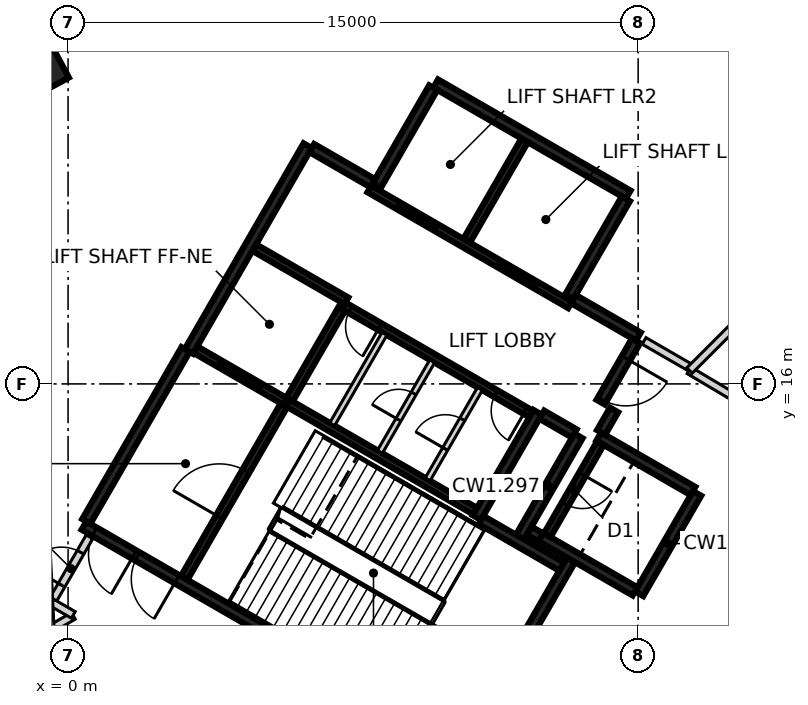
"""IFC4 building model, lengths in metres.
Left out: names, types, materials, properties, quantities, classifications, styles, units other than length and angle.
Written with IfcOpenShell. Run it as: python <this file> out.ifc"""

import sys

from ifc_helpers import new_model, si_unit, direction, frame, frame_2d, origin, origin_2d, place, context, subcontext, project, spatial, rectangle, extrude, element, fill, save


model = new_model("IFC4")
c1 = context("Model", 3, precision=1e-05, world=origin(), true_north=direction((0.0, 1.0)))
c2 = subcontext(c1, "Body", "Model", "MODEL_VIEW")
j1 = project(units=[si_unit("LENGTHUNIT", "METRE"), si_unit("PLANEANGLEUNIT", "RADIAN")], contexts=[c1])
p1 = place(None, origin())
s1 = spatial("IfcSite", under=j1, at=p1, CompositionType="ELEMENT")
p2 = place(p1, origin())
s2 = spatial("IfcBuilding", under=s1, at=p2, CompositionType="ELEMENT")
p3 = place(p2, frame((0.0, 0.0, 14.0)))
s3 = spatial("IfcBuildingStorey", under=s2, at=p3, CompositionType="ELEMENT", Elevation=14.0)
p4 = place(p3, frame((-1.197, 24.423, -0.35), z_axis=(0.0, 0.0, 1.0), x_axis=(-0.476198301069, 0.879337920289, 0.0)))
e1 = element("IfcColumn", 1, at=p4, inside=s3, PredefinedType="COLUMN", context=c2, shape_type="SweptSolid", body=[
    extrude(rectangle(XDim=1.8, YDim=1.8, at=origin_2d()), origin(), (0.0, 0.0, 1.0), 3.1),
])
p5 = place(p3, frame((10.42, 6.498, 0.0), z_axis=(0.0, 0.0, 1.0), x_axis=(-0.866021906294, 0.500006057782, 0.0)))
e2 = element("IfcWall", 2, at=p5, inside=s3, PredefinedType="SHEAR", context=c2, shape_type="SweptSolid", body=[
    extrude(rectangle(XDim=11.55, YDim=0.25, at=frame_2d((5.775, 0.0))), origin(), (0.0, 0.0, 1.0), 5.15),
])
p6 = place(p5, frame((10.025, 0.0, 0.0)))
e3 = element("IfcOpeningElement", 3, at=p6, cuts=e2, PredefinedType="OPENING", context=c2, shape_type="SweptSolid", body=[
    extrude(rectangle(XDim=1.2, YDim=2.1, at=frame_2d((0.6, 1.05))), frame((0.0, 0.135, 0.0), z_axis=(0.0, -1.0, 0.0), x_axis=(1.0, 0.0, 0.0)), (0.0, 0.0, 1.0), 0.27),
])
p7 = place(p5, frame((8.725, 0.0, 0.0)))
e4 = element("IfcOpeningElement", 4, at=p7, cuts=e2, PredefinedType="OPENING", context=c2, shape_type="SweptSolid", body=[
    extrude(rectangle(XDim=1.2, YDim=2.1, at=frame_2d((0.6, 1.05))), frame((0.0, 0.135, 0.0), z_axis=(0.0, -1.0, 0.0), x_axis=(1.0, 0.0, 0.0)), (0.0, 0.0, 1.0), 0.27),
])
p8 = place(p3, frame((3.179, 16.856, 0.0), z_axis=(0.0, 0.0, 1.0), x_axis=(0.500004234368, 0.866022959057, 0.0)))
e5 = element("IfcWall", 5, at=p8, inside=s3, PredefinedType="SHEAR", context=c2, shape_type="SweptSolid", body=[
    extrude(rectangle(XDim=6.25, YDim=0.25, at=frame_2d((3.125, 0.0))), origin(), (0.0, 0.0, 1.0), 5.15),
])
p9 = place(p3, frame((9.673, 23.903, 0.0), z_axis=(0.0, 0.0, 1.0), x_axis=(0.86603616409, -0.499981362141, 0.0)))
e6 = element("IfcWall", 6, at=p9, inside=s3, PredefinedType="SHEAR", context=c2, shape_type="SweptSolid", body=[
    extrude(rectangle(XDim=5.85, YDim=0.25, at=frame_2d((2.925, 0.0))), origin(), (0.0, 0.0, 1.0), 5.15),
])
p10 = place(p3, frame((0.48, 12.381, 0.0), z_axis=(0.0, 0.0, 1.0), x_axis=(0.49999885962, 0.866026062182, 0.0)))
e7 = element("IfcWall", 7, at=p10, inside=s3, PredefinedType="SHEAR", context=c2, shape_type="SweptSolid", body=[
    extrude(rectangle(XDim=5.225, YDim=0.25, at=frame_2d((2.612, 0.0))), origin(), (0.0, 0.0, 1.0), 5.15),
])
p11 = place(p3, frame((13.238, 11.378, 0.0), z_axis=(0.0, 0.0, 1.0), x_axis=(-0.500008851346, -0.866020293397, 0.0)))
e8 = element("IfcWall", 8, at=p11, inside=s3, PredefinedType="SHEAR", context=c2, shape_type="SweptSolid", body=[
    extrude(rectangle(XDim=5.51, YDim=0.25, at=frame_2d((2.755, 0.0))), origin(), (0.0, 0.0, 1.0), 5.15),
])
p12 = place(p3, frame((12.357, 15.252, 0.0), z_axis=(0.0, 0.0, 1.0), x_axis=(-0.500028443584, -0.866008981251, 0.0)))
e9 = element("IfcWall", 9, at=p12, inside=s3, PredefinedType="SHEAR", context=c2, shape_type="SweptSolid", body=[
    extrude(rectangle(XDim=3.2, YDim=0.25, at=frame_2d((1.6, 0.0))), origin(), (0.0, 0.0, 1.0), 5.15),
])
for number, where, z_axis, x_axis in (
    (10, (8.123, 21.219, 0.0), (0.0, 0.0, 1.0), (0.5, 0.866, 0.0)),
    (11, (14.676, 20.87, 0.0), (0.0, 0.0, 1.0), (-0.5, -0.866, 0.0)),
):
    element("IfcWall", number, at=place(p3, frame(where, z_axis=z_axis, x_axis=x_axis)), inside=s3, PredefinedType="SHEAR", context=c2, shape_type="SweptSolid", body=[
        extrude(rectangle(XDim=2.975, YDim=0.25, at=frame_2d((1.487, 0.0))), origin(), (0.0, 0.0, 1.0), 5.15),
    ])
p13 = place(p3, frame((16.552, 13.119, 0.0), z_axis=(0.0, 0.0, 1.0), x_axis=(-0.499978833458, -0.866037623948, 0.0)))
e12 = element("IfcWall", 12, at=p13, inside=s3, PredefinedType="SHEAR", context=c2, shape_type="SweptSolid", body=[
    extrude(rectangle(XDim=3.05, YDim=0.25, at=frame_2d((1.525, 0.0))), origin(), (0.0, 0.0, 1.0), 5.15),
])
p14 = place(p3, frame((14.918, 10.54, 0.0), z_axis=(0.0, 0.0, 1.0), x_axis=(-0.866063538972, 0.499933942099, 0.0)))
e13 = element("IfcWall", 13, at=p14, inside=s3, PredefinedType="SHEAR", context=c2, shape_type="SweptSolid", body=[
    extrude(rectangle(XDim=2.865, YDim=0.25, at=frame_2d((1.432, 0.0))), origin(), (0.0, 0.0, 1.0), 5.15),
])
p15 = place(p3, frame((13.963, 14.614, 0.0), z_axis=(0.0, 0.0, 1.0), x_axis=(0.866042235819, -0.499970844928, 0.0)))
e14 = element("IfcWall", 14, at=p15, inside=s3, PredefinedType="SHEAR", context=c2, shape_type="SweptSolid", body=[
    extrude(rectangle(XDim=2.865, YDim=0.25, at=frame_2d((1.432, 0.0))), origin(), (0.0, 0.0, 1.0), 5.15),
])
p16 = place(p3, frame((11.888, 11.961, 0.0), z_axis=(0.0, 0.0, 1.0), x_axis=(0.500003324108, 0.866023484601, 0.0)))
e15 = element("IfcWall", 15, at=p16, inside=s3, PredefinedType="SHEAR", context=c2, shape_type="SweptSolid", body=[
    extrude(rectangle(XDim=3.085, YDim=0.25, at=frame_2d((1.542, 0.0))), origin(), (0.0, 0.0, 1.0), 5.15),
])
p17 = place(p3, frame((10.865, 12.418, 0.0), z_axis=(0.0, 0.0, 1.0), x_axis=(0.866026229868, -0.499998569178, 0.0)))
e16 = element("IfcWall", 16, at=p17, inside=s3, PredefinedType="SHEAR", context=c2, shape_type="SweptSolid", body=[
    extrude(rectangle(XDim=2.449, YDim=0.25, at=frame_2d((1.225, 0.0))), origin(), (0.0, 0.0, 1.0), 5.15),
])
p18 = place(p3, frame((13.297, 18.231, 0.0), z_axis=(0.0, 0.0, 1.0), x_axis=(0.866043531843, -0.499968599967, 0.0)))
e17 = element("IfcWall", 17, at=p18, inside=s3, PredefinedType="SHEAR", context=c2, shape_type="SweptSolid", body=[
    extrude(rectangle(XDim=1.975, YDim=0.25, at=frame_2d((0.987, 0.0))), origin(), (0.0, 0.0, 1.0), 5.15),
])
p19 = place(p3, frame((6.413, 22.206, 0.0), z_axis=(0.0, 0.0, 1.0), x_axis=(0.866016279763, -0.500015802937, 0.0)))
e18 = element("IfcWall", 18, at=p19, inside=s3, PredefinedType="SHEAR", context=c2, shape_type="SweptSolid", body=[
    extrude(rectangle(XDim=1.849, YDim=0.25, at=frame_2d((0.925, 0.0))), origin(), (0.0, 0.0, 1.0), 5.15),
])
p20 = place(p3, frame((14.945, 17.135, 0.0), z_axis=(0.0, 0.0, 1.0), x_axis=(-0.499983108224, -0.866035156036, 0.0)))
e19 = element("IfcWall", 19, at=p20, inside=s3, PredefinedType="SHEAR", context=c2, shape_type="SweptSolid", body=[
    extrude(rectangle(XDim=1.865, YDim=0.25, at=frame_2d((0.932, 0.0))), origin(), (0.0, 0.0, 1.0), 5.15),
])
p21 = place(p20, frame((0.535, 0.0, 0.0)))
e20 = element("IfcOpeningElement", 20, at=p21, cuts=e19, PredefinedType="OPENING", context=c2, shape_type="SweptSolid", body=[
    extrude(rectangle(XDim=1.25, YDim=2.1, at=frame_2d((0.625, 1.05))), frame((0.0, 0.135, 0.0), z_axis=(0.0, -1.0, 0.0), x_axis=(1.0, 0.0, 0.0)), (0.0, 0.0, 1.0), 0.27),
])
p22 = place(p3, frame((13.322, 14.695, 0.0), z_axis=(0.0, 0.0, 1.0), x_axis=(-0.866017078145, 0.500014420154, 0.0)))
e21 = element("IfcWall", 21, at=p22, inside=s3, PredefinedType="SHEAR", context=c2, shape_type="SweptSolid", body=[
    extrude(rectangle(XDim=0.989, YDim=0.25, at=frame_2d((0.495, 0.0))), origin(), (0.0, 0.0, 1.0), 5.15),
])
p23 = place(p3, frame((14.368, 15.315, 0.0), z_axis=(0.0, 0.0, 1.0), x_axis=(-0.499897359611, -0.866084655132, 0.0)))
e22 = element("IfcWall", 22, at=p23, inside=s3, PredefinedType="SHEAR", context=c2, shape_type="SweptSolid", body=[
    extrude(rectangle(XDim=0.685, YDim=0.25, at=frame_2d((0.342, 0.0))), origin(), (0.0, 0.0, 1.0), 5.15),
])
p24 = place(p3, frame((12.433, 11.964, 0.0), z_axis=(0.0, 0.0, 1.0), x_axis=(-0.866055875208, 0.499947218231, 0.0)))
e23 = element("IfcWall", 23, at=p24, inside=s3, PredefinedType="SHEAR", context=c2, shape_type="SweptSolid", body=[
    extrude(rectangle(XDim=0.345, YDim=0.25, at=frame_2d((0.172, 0.0))), origin(), (0.0, 0.0, 1.0), 5.15),
])
p25 = place(p3, frame((13.21, 18.08, 0.0), z_axis=(0.0, 0.0, 1.0), x_axis=(-0.866030299012, 0.499991521122, 0.0)))
e24 = element("IfcWall", 24, at=p25, inside=s3, PredefinedType="SHEAR", context=c2, shape_type="SweptSolid", body=[
    extrude(rectangle(XDim=6.1, YDim=0.2, at=frame_2d((3.05, 0.0))), origin(), (0.0, 0.0, 1.0), 5.15),
])
p26 = place(p25, frame((1.0, 0.0, 0.0)))
e25 = element("IfcOpeningElement", 25, at=p26, cuts=e24, PredefinedType="OPENING", context=c2, shape_type="SweptSolid", body=[
    extrude(rectangle(XDim=1.2, YDim=2.1, at=frame_2d((0.6, 1.05))), frame((0.0, 0.11, 0.0), z_axis=(0.0, -1.0, 0.0), x_axis=(1.0, 0.0, 0.0)), (0.0, 0.0, 1.0), 0.22),
])
p27 = place(p25, frame((4.05, 0.0, 0.0)))
e26 = element("IfcOpeningElement", 26, at=p27, cuts=e24, PredefinedType="OPENING", context=c2, shape_type="SweptSolid", body=[
    extrude(rectangle(XDim=1.2, YDim=2.1, at=frame_2d((0.6, 1.05))), frame((0.0, 0.11, 0.0), z_axis=(0.0, -1.0, 0.0), x_axis=(1.0, 0.0, 0.0)), (0.0, 0.0, 1.0), 0.22),
])
p28 = place(p3, frame((5.775, 15.502, 0.0), z_axis=(0.0, 0.0, 1.0), x_axis=(0.866020080793, -0.500009219579, 0.0)))
e27 = element("IfcWall", 27, at=p28, inside=s3, PredefinedType="SHEAR", context=c2, shape_type="SweptSolid", body=[
    extrude(rectangle(XDim=5.699, YDim=0.2, at=frame_2d((2.85, 0.0))), origin(), (0.0, 0.0, 1.0), 5.15),
])
p29 = place(p3, frame((12.185, 15.207, 0.0), z_axis=(0.0, 0.0, 1.0), x_axis=(-0.866020080793, 0.500009219579, 0.0)))
e28 = element("IfcWall", 28, at=p29, inside=s3, PredefinedType="SHEAR", context=c2, shape_type="SweptSolid", body=[
    extrude(rectangle(XDim=5.699, YDim=0.2, at=frame_2d((2.85, 0.0))), origin(), (0.0, 0.0, 1.0), 5.15),
])
p30 = place(p29, frame((0.174, 0.0, 0.0)))
e29 = element("IfcOpeningElement", 29, at=p30, cuts=e28, PredefinedType="OPENING", context=c2, shape_type="SweptSolid", body=[
    extrude(rectangle(XDim=0.9, YDim=2.1, at=frame_2d((0.45, 1.05))), frame((0.0, 0.11, 0.0), z_axis=(0.0, -1.0, 0.0), x_axis=(1.0, 0.0, 0.0)), (0.0, 0.0, 1.0), 0.22),
])
p31 = place(p29, frame((4.599, 0.0, 0.0)))
e30 = element("IfcOpeningElement", 30, at=p31, cuts=e28, PredefinedType="OPENING", context=c2, shape_type="SweptSolid", body=[
    extrude(rectangle(XDim=0.9, YDim=2.1, at=frame_2d((0.45, 1.05))), frame((0.0, 0.11, 0.0), z_axis=(0.0, -1.0, 0.0), x_axis=(1.0, 0.0, 0.0)), (0.0, 0.0, 1.0), 0.22),
])
p32 = place(p3, frame((3.057, 10.895, 0.0), z_axis=(0.0, 0.0, 1.0), x_axis=(0.499989418164, 0.866031513124, 0.0)))
e31 = element("IfcWall", 31, at=p32, inside=s3, PredefinedType="SHEAR", context=c2, shape_type="SweptSolid", body=[
    extrude(rectangle(XDim=5.251, YDim=0.2, at=frame_2d((2.625, 0.0))), origin(), (0.0, 0.0, 1.0), 5.15),
])
p33 = place(p32, frame((1.849, 0.0, 0.0)))
e32 = element("IfcOpeningElement", 32, at=p33, cuts=e31, PredefinedType="OPENING", context=c2, shape_type="SweptSolid", body=[
    extrude(rectangle(XDim=1.4, YDim=2.1, at=frame_2d((0.7, 1.05))), frame((0.0, 0.11, 0.0), z_axis=(0.0, -1.0, 0.0), x_axis=(1.0, 0.0, 0.0)), (0.0, 0.0, 1.0), 0.22),
])
p34 = place(p3, frame((10.489, 19.767, 0.0), z_axis=(0.0, 0.0, 1.0), x_axis=(0.499946628782, 0.866056215479, 0.0)))
e33 = element("IfcWall", 33, at=p34, inside=s3, PredefinedType="SHEAR", context=c2, shape_type="SweptSolid", body=[
    extrude(rectangle(XDim=3.048, YDim=0.2, at=frame_2d((1.524, 0.0))), origin(), (0.0, 0.0, 1.0), 5.15),
])
p35 = place(p3, frame((14.008, 14.442, 0.0), z_axis=(0.0, 0.0, 1.0), x_axis=(-0.499986818241, -0.866033014143, 0.0)))
e34 = element("IfcWall", 34, at=p35, inside=s3, PredefinedType="SHEAR", context=c2, shape_type="SweptSolid", body=[
    extrude(rectangle(XDim=2.798, YDim=0.2, at=frame_2d((1.399, 0.0))), origin(), (0.0, 0.0, 1.0), 5.15),
])
p36 = place(p35, frame((0.949, 0.0, 0.0)))
e35 = element("IfcOpeningElement", 35, at=p36, cuts=e34, PredefinedType="OPENING", context=c2, shape_type="SweptSolid", body=[
    extrude(rectangle(XDim=0.9, YDim=2.1, at=frame_2d((0.45, 1.05))), frame((0.0, 0.11, 0.0), z_axis=(0.0, -1.0, 0.0), x_axis=(1.0, 0.0, 0.0)), (0.0, 0.0, 1.0), 0.22),
])
p37 = place(p3, frame((7.199, 17.97, 0.0), z_axis=(0.0, 0.0, 1.0), x_axis=(-0.499968400327, -0.866043647095, 0.0)))
e36 = element("IfcWall", 36, at=p37, inside=s3, PredefinedType="SHEAR", context=c2, shape_type="SweptSolid", body=[
    extrude(rectangle(XDim=2.75, YDim=0.2, at=frame_2d((1.375, 0.0))), origin(), (0.0, 0.0, 1.0), 5.15),
])
p38 = place(p3, frame((5.725, 15.531, 0.0), z_axis=(0.0, 0.0, 1.0), x_axis=(-0.866037306777, 0.499979382845, 0.0)))
e37 = element("IfcWall", 37, at=p38, inside=s3, PredefinedType="SHEAR", context=c2, shape_type="SweptSolid", body=[
    extrude(rectangle(XDim=2.742, YDim=0.2, at=frame_2d((1.371, 0.0))), origin(), (0.0, 0.0, 1.0), 5.15),
])
p39 = place(p38, frame((0.743, 0.0, 0.0)))
e38 = element("IfcOpeningElement", 38, at=p39, cuts=e37, PredefinedType="OPENING", context=c2, shape_type="SweptSolid", body=[
    extrude(rectangle(XDim=1.3, YDim=2.1, at=frame_2d((0.65, 1.05))), frame((0.0, 0.11, 0.0), z_axis=(0.0, -1.0, 0.0), x_axis=(1.0, 0.0, 0.0)), (0.0, 0.0, 1.0), 0.22),
])
p40 = place(p3, frame((4.901, 19.586, 0.0), z_axis=(0.0, 0.0, 1.0), x_axis=(0.866022890907, -0.500004352405, 0.0)))
e39 = element("IfcWall", 39, at=p40, inside=s3, PredefinedType="SHEAR", context=c2, shape_type="SweptSolid", body=[
    extrude(rectangle(XDim=2.799, YDim=0.2, at=frame_2d((1.399, 0.0))), origin(), (0.0, 0.0, 1.0), 5.15),
])
p41 = place(p3, frame((9.462, 13.489, 0.0), z_axis=(0.0, 0.0, 1.0), x_axis=(0.50002746344, 0.86600954718, 0.0)))
e40 = element("IfcWall", 40, at=p41, inside=s3, PredefinedType="PARTITIONING", context=c2, shape_type="SweptSolid", body=[
    extrude(rectangle(XDim=2.748, YDim=0.15, at=frame_2d((1.374, 0.0))), origin(), (0.0, 0.0, 1.0), 5.15),
])
p42 = place(p41, frame((0.924, 0.0, 0.0)))
e41 = element("IfcOpeningElement", 41, at=p42, cuts=e40, PredefinedType="OPENING", context=c2, shape_type="SweptSolid", body=[
    extrude(rectangle(XDim=0.9, YDim=2.1, at=frame_2d((0.45, 1.05))), frame((0.0, 0.085, 0.0), z_axis=(0.0, -1.0, 0.0), x_axis=(1.0, 0.0, 0.0)), (0.0, 0.0, 1.0), 0.17),
])
p43 = place(p3, frame((8.207, 14.214, 0.0), z_axis=(0.0, 0.0, 1.0), x_axis=(0.499922376475, 0.866070215109, 0.0)))
e42 = element("IfcWall", 42, at=p43, inside=s3, PredefinedType="PARTITIONING", context=c2, shape_type="SweptSolid", body=[
    extrude(rectangle(XDim=2.749, YDim=0.15, at=frame_2d((1.374, 0.0))), origin(), (0.0, 0.0, 1.0), 5.15),
])
p44 = place(p43, frame((0.974, 0.0, 0.0)))
e43 = element("IfcOpeningElement", 43, at=p44, cuts=e42, PredefinedType="OPENING", context=c2, shape_type="SweptSolid", body=[
    extrude(rectangle(XDim=0.8, YDim=2.1, at=frame_2d((0.4, 1.05))), frame((0.0, 0.085, 0.0), z_axis=(0.0, -1.0, 0.0), x_axis=(1.0, 0.0, 0.0)), (0.0, 0.0, 1.0), 0.17),
])
p45 = place(p3, frame((6.951, 14.939, 0.0), z_axis=(0.0, 0.0, 1.0), x_axis=(0.50002746344, 0.86600954718, 0.0)))
e44 = element("IfcWall", 44, at=p45, inside=s3, PredefinedType="PARTITIONING", context=c2, shape_type="SweptSolid", body=[
    extrude(rectangle(XDim=2.748, YDim=0.15, at=frame_2d((1.374, 0.0))), origin(), (0.0, 0.0, 1.0), 5.15),
])
p46 = place(p3, frame((-7.53, 5.473, 0.0), z_axis=(0.0, 0.0, 1.0), x_axis=(0.866256262405, 0.499599927786, 0.0)))
e45 = element("IfcWall", 45, at=p46, inside=s3, PredefinedType="PARTITIONING", context=c2, shape_type="SweptSolid", body=[
    extrude(rectangle(XDim=8.855, YDim=0.2, at=frame_2d((4.428, 0.0))), origin(), (0.0, 0.0, 1.0), 5.15),
])
p47 = place(p3, frame((-0.43, 10.259, 0.0), z_axis=(0.0, 0.0, 1.0), x_axis=(0.500667330647, 0.865639777288, 0.0)))
e46 = element("IfcWall", 46, at=p47, inside=s3, PredefinedType="PARTITIONING", context=c2, shape_type="SweptSolid", body=[
    extrude(rectangle(XDim=1.983, YDim=0.2, at=frame_2d((0.991, 0.0))), origin(), (0.0, 0.0, 1.0), 5.15),
])
p48 = place(p47, frame((0.515, 0.0, 0.0)))
e47 = element("IfcOpeningElement", 47, at=p48, cuts=e46, PredefinedType="OPENING", context=c2, shape_type="SweptSolid", body=[
    extrude(rectangle(XDim=1.0, YDim=2.1, at=frame_2d((0.5, 1.05))), frame((0.0, 0.11, 0.0), z_axis=(0.0, -1.0, 0.0), x_axis=(1.0, 0.0, 0.0)), (0.0, 0.0, 1.0), 0.22),
])
p49 = place(p3, frame((-0.424, 10.246, 0.0), z_axis=(0.0, 0.0, 1.0), x_axis=(0.866360968405, -0.499418334089, 0.0)))
e48 = element("IfcWall", 48, at=p49, inside=s3, PredefinedType="PARTITIONING", context=c2, shape_type="SweptSolid", body=[
    extrude(rectangle(XDim=0.649, YDim=0.2, at=frame_2d((0.324, 0.0))), origin(), (0.0, 0.0, 1.0), 5.15),
])
p50 = place(p3, frame((15.156, 17.131, 0.0), z_axis=(0.0, 0.0, 1.0), x_axis=(0.865567897455, -0.500791588284, 0.0)))
e49 = element("IfcWall", 49, at=p50, inside=s3, PredefinedType="PARTITIONING", context=c2, shape_type="SweptSolid", body=[
    extrude(rectangle(XDim=1.377, YDim=0.2, at=frame_2d((0.688, 0.0))), origin(), (0.0, 0.0, 1.0), 5.15),
])
p51 = place(p3, frame((16.341, 16.356, 0.0), z_axis=(0.0, 0.0, 1.0), x_axis=(0.859680670174, -0.510831817067, 0.0)))
e50 = element("IfcWall", 50, at=p51, inside=s3, PredefinedType="PARTITIONING", context=c2, shape_type="SweptSolid", body=[
    extrude(rectangle(XDim=2.502, YDim=0.2, at=frame_2d((1.251, 0.0))), origin(), (0.0, 0.0, 1.0), 5.15),
])
p52 = place(p3, frame((16.957, 8.542, 0.0), z_axis=(0.0, 0.0, 1.0), x_axis=(0.506952960322, 0.861973721189, 0.0)))
e51 = element("IfcWall", 51, at=p52, inside=s3, PredefinedType="PARTITIONING", context=c2, shape_type="SweptSolid", body=[
    extrude(rectangle(XDim=4.448, YDim=0.2, at=frame_2d((2.224, 0.0))), origin(), (0.0, 0.0, 1.0), 5.15),
])
p53 = place(p3, frame((-1.486, 30.314, 0.0), z_axis=(0.0, 0.0, 1.0), x_axis=(0.048977126554, -0.998799900418, 0.0)))
e52 = element("IfcWall", 52, at=p53, inside=s3, PredefinedType="PARTITIONING", context=c2, shape_type="SweptSolid", body=[
    extrude(rectangle(XDim=20.792, YDim=0.2, at=frame_2d((10.396, 0.0))), origin(), (0.0, 0.0, 1.0), 2.75),
])
p54 = place(p3, frame((16.352, 16.352, 0.0), z_axis=(0.0, 0.0, 1.0), x_axis=(0.707106781187, 0.707106781187, 0.0)))
e53 = element("IfcWall", 53, at=p54, inside=s3, PredefinedType="PARTITIONING", context=c2, shape_type="SweptSolid", body=[
    extrude(rectangle(XDim=15.054, YDim=0.2, at=frame_2d((7.527, 0.0))), origin(), (0.0, 0.0, 1.0), 2.75),
])
p55 = place(p39, origin())
e54 = element("IfcDoor", 54, at=p55, inside=s3, OperationType="SLIDING_TO_LEFT", PredefinedType="DOOR", context=c2, shape_type="SweptSolid", body=[
    extrude(rectangle(XDim=1.3, YDim=2.1, at=frame_2d((0.65, 1.05))), frame((0.0, 0.025, 0.0), z_axis=(0.0, -1.0, 0.0), x_axis=(1.0, 0.0, 0.0)), (0.0, 0.0, 1.0), 0.05),
])
fill(e38, e54)
p56 = place(p26, origin())
e55 = element("IfcDoor", 55, at=p56, inside=s3, OperationType="DOUBLE_DOOR_SLIDING", PredefinedType="DOOR", context=c2, shape_type="SweptSolid", body=[
    extrude(rectangle(XDim=1.2, YDim=2.1, at=frame_2d((0.6, 1.05))), frame((0.0, 0.025, 0.0), z_axis=(0.0, -1.0, 0.0), x_axis=(1.0, 0.0, 0.0)), (0.0, 0.0, 1.0), 0.05),
])
fill(e25, e55)
p57 = place(p27, origin())
e56 = element("IfcDoor", 56, at=p57, inside=s3, OperationType="DOUBLE_DOOR_SLIDING", PredefinedType="DOOR", context=c2, shape_type="SweptSolid", body=[
    extrude(rectangle(XDim=1.2, YDim=2.1, at=frame_2d((0.6, 1.05))), frame((0.0, 0.025, 0.0), z_axis=(0.0, -1.0, 0.0), x_axis=(1.0, 0.0, 0.0)), (0.0, 0.0, 1.0), 0.05),
])
fill(e26, e56)
p58 = place(p21, origin())
e57 = element("IfcDoor", 57, at=p58, inside=s3, OperationType="SINGLE_SWING_LEFT", PredefinedType="DOOR", context=c2, shape_type="SweptSolid", body=[
    extrude(rectangle(XDim=1.25, YDim=2.1, at=frame_2d((0.625, 1.05))), frame((0.0, 0.025, 0.0), z_axis=(0.0, -1.0, 0.0), x_axis=(1.0, 0.0, 0.0)), (0.0, 0.0, 1.0), 0.05),
])
fill(e20, e57)
p59 = place(p6, origin())
e58 = element("IfcDoor", 58, at=p59, inside=s3, OperationType="SINGLE_SWING_LEFT", PredefinedType="DOOR", context=c2, shape_type="SweptSolid", body=[
    extrude(rectangle(XDim=1.2, YDim=2.1, at=frame_2d((0.6, 1.05))), frame((0.0, 0.025, 0.0), z_axis=(0.0, -1.0, 0.0), x_axis=(1.0, 0.0, 0.0)), (0.0, 0.0, 1.0), 0.05),
])
fill(e3, e58)
p60 = place(p7, origin())
e59 = element("IfcDoor", 59, at=p60, inside=s3, OperationType="SINGLE_SWING_RIGHT", PredefinedType="DOOR", context=c2, shape_type="SweptSolid", body=[
    extrude(rectangle(XDim=1.2, YDim=2.1, at=frame_2d((0.6, 1.05))), frame((0.0, 0.025, 0.0), z_axis=(0.0, -1.0, 0.0), x_axis=(1.0, 0.0, 0.0)), (0.0, 0.0, 1.0), 0.05),
])
fill(e4, e59)
p61 = place(p33, origin())
e60 = element("IfcDoor", 60, at=p61, inside=s3, OperationType="SINGLE_SWING_LEFT", PredefinedType="DOOR", context=c2, shape_type="SweptSolid", body=[
    extrude(rectangle(XDim=1.4, YDim=2.1, at=frame_2d((0.7, 1.05))), frame((0.0, 0.025, 0.0), z_axis=(0.0, -1.0, 0.0), x_axis=(1.0, 0.0, 0.0)), (0.0, 0.0, 1.0), 0.05),
])
fill(e32, e60)
p62 = place(p30, origin())
e61 = element("IfcDoor", 61, at=p62, inside=s3, OperationType="SINGLE_SWING_RIGHT", PredefinedType="DOOR", context=c2, shape_type="SweptSolid", body=[
    extrude(rectangle(XDim=0.9, YDim=2.1, at=frame_2d((0.45, 1.05))), frame((0.0, 0.025, 0.0), z_axis=(0.0, -1.0, 0.0), x_axis=(1.0, 0.0, 0.0)), (0.0, 0.0, 1.0), 0.05),
])
fill(e29, e61)
p63 = place(p42, origin())
e62 = element("IfcDoor", 62, at=p63, inside=s3, OperationType="SINGLE_SWING_LEFT", PredefinedType="DOOR", context=c2, shape_type="SweptSolid", body=[
    extrude(rectangle(XDim=0.9, YDim=2.1, at=frame_2d((0.45, 1.05))), frame((0.0, 0.025, 0.0), z_axis=(0.0, -1.0, 0.0), x_axis=(1.0, 0.0, 0.0)), (0.0, 0.0, 1.0), 0.05),
])
fill(e41, e62)
p64 = place(p44, origin())
e63 = element("IfcDoor", 63, at=p64, inside=s3, OperationType="SINGLE_SWING_RIGHT", PredefinedType="DOOR", context=c2, shape_type="SweptSolid", body=[
    extrude(rectangle(XDim=0.8, YDim=2.1, at=frame_2d((0.4, 1.05))), frame((0.0, 0.025, 0.0), z_axis=(0.0, -1.0, 0.0), x_axis=(1.0, 0.0, 0.0)), (0.0, 0.0, 1.0), 0.05),
])
fill(e43, e63)
p65 = place(p31, origin())
e64 = element("IfcDoor", 64, at=p65, inside=s3, OperationType="SINGLE_SWING_LEFT", PredefinedType="DOOR", context=c2, shape_type="SweptSolid", body=[
    extrude(rectangle(XDim=0.9, YDim=2.1, at=frame_2d((0.45, 1.05))), frame((0.0, 0.025, 0.0), z_axis=(0.0, -1.0, 0.0), x_axis=(1.0, 0.0, 0.0)), (0.0, 0.0, 1.0), 0.05),
])
fill(e30, e64)
p66 = place(p36, origin())
e65 = element("IfcDoor", 65, at=p66, inside=s3, OperationType="SINGLE_SWING_RIGHT", PredefinedType="DOOR", context=c2, shape_type="SweptSolid", body=[
    extrude(rectangle(XDim=0.9, YDim=2.1, at=frame_2d((0.45, 1.05))), frame((0.0, 0.025, 0.0), z_axis=(0.0, -1.0, 0.0), x_axis=(1.0, 0.0, 0.0)), (0.0, 0.0, 1.0), 0.05),
])
fill(e35, e65)
p67 = place(p48, frame((1.0, 0.0, 0.0), z_axis=(0.0, 0.0, 1.0), x_axis=(-1.0, 0.0, 0.0)))
e66 = element("IfcDoor", 66, at=p67, inside=s3, OperationType="SINGLE_SWING_LEFT", PredefinedType="DOOR", context=c2, shape_type="SweptSolid", body=[
    extrude(rectangle(XDim=1.0, YDim=2.1, at=frame_2d((0.5, 1.05))), frame((0.0, 0.025, 0.0), z_axis=(0.0, -1.0, 0.0), x_axis=(1.0, 0.0, 0.0)), (0.0, 0.0, 1.0), 0.05),
])
fill(e47, e66)
save(model, sys.argv[1])
